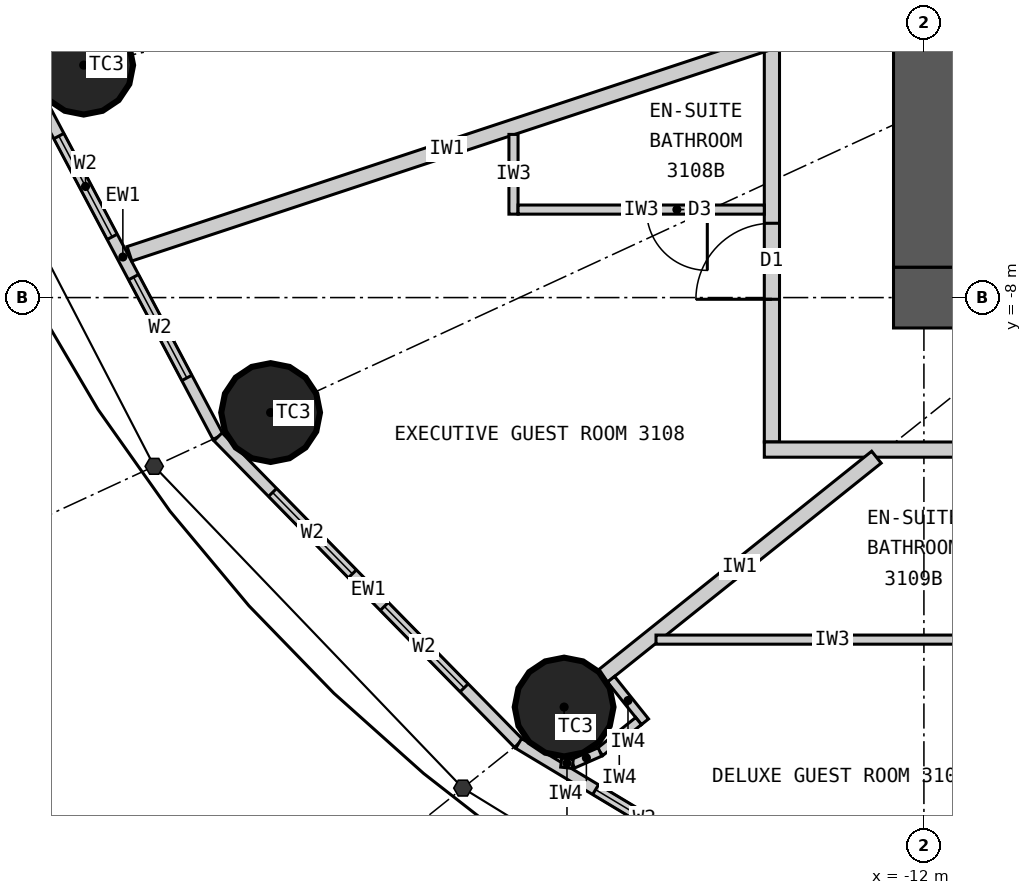
"""IFC4 building model, lengths in metres.
Left out: names, types, materials, properties, quantities, classifications, styles, units other than length and angle.
Written with IfcOpenShell. Run it as: python <this file> out.ifc"""

import sys

from ifc_helpers import new_model, si_unit, direction, frame, frame_2d, origin, origin_2d, place, context, subcontext, project, spatial, rectangle, circle, extrude, element, fill, save


model = new_model("IFC4")
c1 = context("Model", 3, precision=1e-05, world=origin(), true_north=direction((0.0, 1.0)))
c2 = subcontext(c1, "Body", "Model", "MODEL_VIEW")
j1 = project(units=[si_unit("LENGTHUNIT", "METRE"), si_unit("PLANEANGLEUNIT", "RADIAN")], contexts=[c1])
p1 = place(None, origin())
s1 = spatial("IfcSite", under=j1, at=p1, CompositionType="ELEMENT")
p2 = place(p1, origin())
s2 = spatial("IfcBuilding", under=s1, at=p2, CompositionType="ELEMENT")
p3 = place(p2, frame((0.0, 0.0, 122.1)))
s3 = spatial("IfcBuildingStorey", under=s2, at=p3, CompositionType="ELEMENT", Elevation=122.1)
for number, where, z_axis, x_axis in (
    (1, (-23.055, -4.942, 0.0), (0.0, 0.0, 1.0), (1.0, 0.0, 0.0)),
    (2, (-20.596, -9.513, 0.0), (0.0, 0.0, 1.0), (1.0, 0.0, 0.0)),
    (3, (-16.734, -13.387, 0.0), (0.0, 0.0, 1.0), (1.0, 0.0, 0.0)),
):
    element("IfcColumn", number, at=place(p3, frame(where, z_axis=z_axis, x_axis=x_axis)), inside=s3, PredefinedType="COLUMN", context=c2, shape_type="SweptSolid", body=[
        extrude(circle(Radius=0.65, at=origin_2d()), origin(), (0.0, 0.0, 1.0), 3.3),
    ])
p4 = place(p3, frame((12.4, -8.0, 0.0), z_axis=(0.0, 0.0, 1.0), x_axis=(-1.0, 0.0, 0.0)))
e4 = element("IfcWall", 4, at=p4, inside=s3, PredefinedType="SHEAR", context=c2, shape_type="SweptSolid", body=[
    extrude(rectangle(XDim=24.8, YDim=0.8, at=frame_2d((12.4, 0.0))), origin(), (0.0, 0.0, 1.0), 3.3),
])
p5 = place(p4, frame((11.1, 0.0, 0.0)))
e5 = element("IfcOpeningElement", 5, at=p5, cuts=e4, PredefinedType="OPENING", context=c2, shape_type="SweptSolid", body=[
    extrude(rectangle(XDim=1.2, YDim=2.2, at=frame_2d((0.6, 1.1))), frame((0.0, 0.41, 0.0), z_axis=(0.0, -1.0, 0.0), x_axis=(1.0, 0.0, 0.0)), (0.0, 0.0, 1.0), 0.82),
])
p6 = place(p4, frame((18.7, 0.0, 0.0)))
e6 = element("IfcOpeningElement", 6, at=p6, cuts=e4, PredefinedType="OPENING", context=c2, shape_type="SweptSolid", body=[
    extrude(rectangle(XDim=0.9, YDim=2.2, at=frame_2d((0.45, 1.1))), frame((0.0, 0.41, 0.0), z_axis=(0.0, -1.0, 0.0), x_axis=(1.0, 0.0, 0.0)), (0.0, 0.0, 1.0), 0.82),
])
p7 = place(p3, frame((-12.0, 7.6, 0.0), z_axis=(0.0, 0.0, 1.0), x_axis=(0.0, -1.0, 0.0)))
e7 = element("IfcWall", 7, at=p7, inside=s3, PredefinedType="SHEAR", context=c2, shape_type="SweptSolid", body=[
    extrude(rectangle(XDim=15.2, YDim=0.8, at=frame_2d((7.6, 0.0))), origin(), (0.0, 0.0, 1.0), 3.3),
])
p8 = place(p7, frame((6.7, 0.0, 0.0)))
e8 = element("IfcOpeningElement", 8, at=p8, cuts=e7, PredefinedType="OPENING", context=c2, shape_type="SweptSolid", body=[
    extrude(rectangle(XDim=1.8, YDim=2.2, at=frame_2d((0.9, 1.1))), frame((0.0, 0.41, 0.0), z_axis=(0.0, -1.0, 0.0), x_axis=(1.0, 0.0, 0.0)), (0.0, 0.0, 1.0), 0.82),
])
p9 = place(p3, frame((-23.792, -5.1, 0.0), z_axis=(0.0, 0.0, 1.0), x_axis=(0.467814388454, -0.883826735257, 0.0)))
e9 = element("IfcWall", 9, at=p9, inside=s3, PredefinedType="ELEMENTEDWALL", context=c2, shape_type="SweptSolid", body=[
    extrude(rectangle(XDim=5.354, YDim=0.15, at=frame_2d((2.677, 0.0))), origin(), (0.0, 0.0, 1.0), 3.12),
])
p10 = place(p9, frame((0.877, 0.0, 0.9)))
e10 = element("IfcOpeningElement", 10, at=p10, cuts=e9, PredefinedType="OPENING", context=c2, shape_type="SweptSolid", body=[
    extrude(rectangle(XDim=1.5, YDim=1.9, at=frame_2d((0.75, 0.95))), frame((0.0, 0.085, 0.0), z_axis=(0.0, -1.0, 0.0), x_axis=(1.0, 0.0, 0.0)), (0.0, 0.0, 1.0), 0.17),
])
p11 = place(p9, frame((2.977, 0.0, 0.9)))
e11 = element("IfcOpeningElement", 11, at=p11, cuts=e9, PredefinedType="OPENING", context=c2, shape_type="SweptSolid", body=[
    extrude(rectangle(XDim=1.5, YDim=1.9, at=frame_2d((0.75, 0.95))), frame((0.0, 0.085, 0.0), z_axis=(0.0, -1.0, 0.0), x_axis=(1.0, 0.0, 0.0)), (0.0, 0.0, 1.0), 0.17),
])
p12 = place(p3, frame((-21.287, -9.832, 0.0), z_axis=(0.0, 0.0, 1.0), x_axis=(0.700136650834, -0.714008872605, 0.0)))
e12 = element("IfcWall", 12, at=p12, inside=s3, PredefinedType="ELEMENTEDWALL", context=c2, shape_type="SweptSolid", body=[
    extrude(rectangle(XDim=5.649, YDim=0.15, at=frame_2d((2.825, 0.0))), origin(), (0.0, 0.0, 1.0), 3.12),
])
p13 = place(p12, frame((1.025, 0.0, 0.9)))
e13 = element("IfcOpeningElement", 13, at=p13, cuts=e12, PredefinedType="OPENING", context=c2, shape_type="SweptSolid", body=[
    extrude(rectangle(XDim=1.5, YDim=1.9, at=frame_2d((0.75, 0.95))), frame((0.0, 0.085, 0.0), z_axis=(0.0, -1.0, 0.0), x_axis=(1.0, 0.0, 0.0)), (0.0, 0.0, 1.0), 0.17),
])
p14 = place(p12, frame((3.125, 0.0, 0.9)))
e14 = element("IfcOpeningElement", 14, at=p14, cuts=e12, PredefinedType="OPENING", context=c2, shape_type="SweptSolid", body=[
    extrude(rectangle(XDim=1.5, YDim=1.9, at=frame_2d((0.75, 0.95))), frame((0.0, 0.085, 0.0), z_axis=(0.0, -1.0, 0.0), x_axis=(1.0, 0.0, 0.0)), (0.0, 0.0, 1.0), 0.17),
])
p15 = place(p3, frame((-17.332, -13.866, 0.0), z_axis=(0.0, 0.0, 1.0), x_axis=(0.857308573723, -0.514802884044, 0.0)))
e15 = element("IfcWall", 15, at=p15, inside=s3, PredefinedType="ELEMENTEDWALL", context=c2, shape_type="SweptSolid", body=[
    extrude(rectangle(XDim=5.961, YDim=0.15, at=frame_2d((2.98, 0.0))), origin(), (0.0, 0.0, 1.0), 3.12),
])
p16 = place(p15, frame((1.181, 0.0, 0.9)))
e16 = element("IfcOpeningElement", 16, at=p16, cuts=e15, PredefinedType="OPENING", context=c2, shape_type="SweptSolid", body=[
    extrude(rectangle(XDim=1.5, YDim=1.9, at=frame_2d((0.75, 0.95))), frame((0.0, 0.085, 0.0), z_axis=(0.0, -1.0, 0.0), x_axis=(1.0, 0.0, 0.0)), (0.0, 0.0, 1.0), 0.17),
])
p17 = place(p15, frame((3.281, 0.0, 0.9)))
e17 = element("IfcOpeningElement", 17, at=p17, cuts=e15, PredefinedType="OPENING", context=c2, shape_type="SweptSolid", body=[
    extrude(rectangle(XDim=1.5, YDim=1.9, at=frame_2d((0.75, 0.95))), frame((0.0, 0.085, 0.0), z_axis=(0.0, -1.0, 0.0), x_axis=(1.0, 0.0, 0.0)), (0.0, 0.0, 1.0), 0.17),
])
p18 = place(p3, frame((-14.0, 9.9, 0.0), z_axis=(0.0, 0.0, 1.0), x_axis=(0.0, -1.0, 0.0)))
e18 = element("IfcWall", 18, at=p18, inside=s3, PredefinedType="PARTITIONING", context=c2, shape_type="SweptSolid", body=[
    extrude(rectangle(XDim=19.8, YDim=0.2, at=frame_2d((9.9, 0.0))), origin(), (0.0, 0.0, 1.0), 3.12),
])
p19 = place(p18, frame((1.678, 0.0, 0.0)))
e19 = element("IfcOpeningElement", 19, at=p19, cuts=e18, PredefinedType="OPENING", context=c2, shape_type="SweptSolid", body=[
    extrude(rectangle(XDim=1.0, YDim=2.2, at=frame_2d((0.5, 1.1))), frame((0.0, 0.11, 0.0), z_axis=(0.0, -1.0, 0.0), x_axis=(1.0, 0.0, 0.0)), (0.0, 0.0, 1.0), 0.22),
])
p20 = place(p18, frame((7.598, 0.0, 0.0)))
e20 = element("IfcOpeningElement", 20, at=p20, cuts=e18, PredefinedType="OPENING", context=c2, shape_type="SweptSolid", body=[
    extrude(rectangle(XDim=1.0, YDim=2.2, at=frame_2d((0.5, 1.1))), frame((0.0, 0.11, 0.0), z_axis=(0.0, -1.0, 0.0), x_axis=(1.0, 0.0, 0.0)), (0.0, 0.0, 1.0), 0.22),
])
p21 = place(p18, frame((12.26, 0.0, 0.0)))
e21 = element("IfcOpeningElement", 21, at=p21, cuts=e18, PredefinedType="OPENING", context=c2, shape_type="SweptSolid", body=[
    extrude(rectangle(XDim=1.0, YDim=2.2, at=frame_2d((0.5, 1.1))), frame((0.0, 0.11, 0.0), z_axis=(0.0, -1.0, 0.0), x_axis=(1.0, 0.0, 0.0)), (0.0, 0.0, 1.0), 0.22),
])
p22 = place(p18, frame((16.922, 0.0, 0.0)))
e22 = element("IfcOpeningElement", 22, at=p22, cuts=e18, PredefinedType="OPENING", context=c2, shape_type="SweptSolid", body=[
    extrude(rectangle(XDim=1.0, YDim=2.2, at=frame_2d((0.5, 1.1))), frame((0.0, 0.11, 0.0), z_axis=(0.0, -1.0, 0.0), x_axis=(1.0, 0.0, 0.0)), (0.0, 0.0, 1.0), 0.22),
])
p23 = place(p3, frame((-3.283, -10.0, 0.0), z_axis=(0.0, 0.0, 1.0), x_axis=(-1.0, 0.0, 0.0)))
e23 = element("IfcWall", 23, at=p23, inside=s3, PredefinedType="PARTITIONING", context=c2, shape_type="SweptSolid", body=[
    extrude(rectangle(XDim=10.817, YDim=0.2, at=frame_2d((5.409, 0.0))), origin(), (0.0, 0.0, 1.0), 3.12),
])
p24 = place(p23, frame((6.482, 0.0, 0.0)))
e24 = element("IfcOpeningElement", 24, at=p24, cuts=e23, PredefinedType="OPENING", context=c2, shape_type="SweptSolid", body=[
    extrude(rectangle(XDim=1.0, YDim=2.2, at=frame_2d((0.5, 1.1))), frame((0.0, 0.11, 0.0), z_axis=(0.0, -1.0, 0.0), x_axis=(1.0, 0.0, 0.0)), (0.0, 0.0, 1.0), 0.22),
])
p25 = place(p3, frame((-14.1, -4.662, 0.0), z_axis=(0.0, 0.0, 1.0), x_axis=(-0.949446466373, -0.313928984789, 0.0)))
e25 = element("IfcWall", 25, at=p25, inside=s3, PredefinedType="PARTITIONING", context=c2, shape_type="SweptSolid", body=[
    extrude(rectangle(XDim=8.797, YDim=0.2, at=frame_2d((4.399, 0.0))), origin(), (0.0, 0.0, 1.0), 3.12),
])
p26 = place(p3, frame((-12.625, -10.1, 0.0), z_axis=(0.0, 0.0, 1.0), x_axis=(-0.780863644897, -0.624701503182, 0.0)))
e26 = element("IfcWall", 26, at=p26, inside=s3, PredefinedType="PARTITIONING", context=c2, shape_type="SweptSolid", body=[
    extrude(rectangle(XDim=4.612, YDim=0.2, at=frame_2d((2.306, 0.0))), origin(), (0.0, 0.0, 1.0), 2.37),
])
p27 = place(p3, frame((-17.4, -5.854, 0.0), z_axis=(0.0, 0.0, 1.0), x_axis=(0.0, -1.0, 0.0)))
e27 = element("IfcWall", 27, at=p27, inside=s3, PredefinedType="PARTITIONING", context=c2, shape_type="SweptSolid", body=[
    extrude(rectangle(XDim=1.049, YDim=0.12, at=frame_2d((0.524, 0.0))), origin(), (0.0, 0.0, 1.0), 3.12),
])
p28 = place(p3, frame((-14.1, -6.842, 0.0), z_axis=(0.0, 0.0, 1.0), x_axis=(-1.0, 0.0, 0.0)))
e28 = element("IfcWall", 28, at=p28, inside=s3, PredefinedType="PARTITIONING", context=c2, shape_type="SweptSolid", body=[
    extrude(rectangle(XDim=3.24, YDim=0.12, at=frame_2d((1.62, 0.0))), origin(), (0.0, 0.0, 1.0), 3.12),
])
p29 = place(p28, frame((0.75, 0.0, 0.0)))
e29 = element("IfcOpeningElement", 29, at=p29, cuts=e28, PredefinedType="OPENING", context=c2, shape_type="SweptSolid", body=[
    extrude(rectangle(XDim=0.8, YDim=2.1, at=frame_2d((0.4, 1.05))), frame((0.0, 0.07, 0.0), z_axis=(0.0, -1.0, 0.0), x_axis=(1.0, 0.0, 0.0)), (0.0, 0.0, 1.0), 0.14),
])
p30 = place(p3, frame((-15.525, -12.5, 0.0), z_axis=(0.0, 0.0, 1.0), x_axis=(1.0, 0.0, 0.0)))
e30 = element("IfcWall", 30, at=p30, inside=s3, PredefinedType="PARTITIONING", context=c2, shape_type="SweptSolid", body=[
    extrude(rectangle(XDim=4.64, YDim=0.12, at=frame_2d((2.32, 0.0))), origin(), (0.0, 0.0, 1.0), 3.12),
])
p31 = place(p3, frame((-16.117, -13.022, 0.0), z_axis=(0.0, 0.0, 1.0), x_axis=(0.62465344249, -0.780902091677, 0.0)))
e31 = element("IfcWall", 31, at=p31, inside=s3, PredefinedType="PARTITIONING", context=c2, shape_type="SweptSolid", body=[
    extrude(rectangle(XDim=0.716, YDim=0.12, at=frame_2d((0.358, 0.0))), origin(), (0.0, 0.0, 1.0), 3.12),
])
p32 = place(p3, frame((-15.754, -13.571, 0.0), z_axis=(0.0, 0.0, 1.0), x_axis=(-0.780905453553, -0.624649239663, 0.0)))
e32 = element("IfcWall", 32, at=p32, inside=s3, PredefinedType="PARTITIONING", context=c2, shape_type="SweptSolid", body=[
    extrude(rectangle(XDim=0.65, YDim=0.12, at=frame_2d((0.325, 0.0))), origin(), (0.0, 0.0, 1.0), 3.12),
])
p33 = place(p3, frame((-16.262, -13.977, 0.0), z_axis=(0.0, 0.0, 1.0), x_axis=(-0.915985403703, -0.401211590314, 0.0)))
e33 = element("IfcWall", 33, at=p33, inside=s3, PredefinedType="PARTITIONING", context=c2, shape_type="SweptSolid", body=[
    extrude(rectangle(XDim=0.391, YDim=0.12, at=frame_2d((0.196, 0.0))), origin(), (0.0, 0.0, 1.0), 3.12),
])
p34 = place(p3, frame((-16.62, -14.134, 0.0), z_axis=(0.0, 0.0, 1.0), x_axis=(-0.993941871493, 0.109907033867, 0.0)))
e34 = element("IfcWall", 34, at=p34, inside=s3, PredefinedType="PARTITIONING", context=c2, shape_type="SweptSolid", body=[
    extrude(rectangle(XDim=0.153, YDim=0.12, at=frame_2d((0.077, 0.0))), origin(), (0.0, 0.0, 1.0), 3.12),
])
p35 = place(p10, origin())
e35 = element("IfcWindow", 35, at=p35, inside=s3, PartitioningType="SINGLE_PANEL", PredefinedType="WINDOW", context=c2, shape_type="SweptSolid", body=[
    extrude(rectangle(XDim=1.5, YDim=1.9, at=frame_2d((0.75, 0.95))), frame((0.0, 0.03, 0.0), z_axis=(0.0, -1.0, 0.0), x_axis=(1.0, 0.0, 0.0)), (0.0, 0.0, 1.0), 0.06),
])
fill(e10, e35)
p36 = place(p11, origin())
e36 = element("IfcWindow", 36, at=p36, inside=s3, PartitioningType="SINGLE_PANEL", PredefinedType="WINDOW", context=c2, shape_type="SweptSolid", body=[
    extrude(rectangle(XDim=1.5, YDim=1.9, at=frame_2d((0.75, 0.95))), frame((0.0, 0.03, 0.0), z_axis=(0.0, -1.0, 0.0), x_axis=(1.0, 0.0, 0.0)), (0.0, 0.0, 1.0), 0.06),
])
fill(e11, e36)
p37 = place(p13, origin())
e37 = element("IfcWindow", 37, at=p37, inside=s3, PartitioningType="SINGLE_PANEL", PredefinedType="WINDOW", context=c2, shape_type="SweptSolid", body=[
    extrude(rectangle(XDim=1.5, YDim=1.9, at=frame_2d((0.75, 0.95))), frame((0.0, 0.03, 0.0), z_axis=(0.0, -1.0, 0.0), x_axis=(1.0, 0.0, 0.0)), (0.0, 0.0, 1.0), 0.06),
])
fill(e13, e37)
p38 = place(p14, origin())
e38 = element("IfcWindow", 38, at=p38, inside=s3, PartitioningType="SINGLE_PANEL", PredefinedType="WINDOW", context=c2, shape_type="SweptSolid", body=[
    extrude(rectangle(XDim=1.5, YDim=1.9, at=frame_2d((0.75, 0.95))), frame((0.0, 0.03, 0.0), z_axis=(0.0, -1.0, 0.0), x_axis=(1.0, 0.0, 0.0)), (0.0, 0.0, 1.0), 0.06),
])
fill(e14, e38)
p39 = place(p16, origin())
e39 = element("IfcWindow", 39, at=p39, inside=s3, PartitioningType="SINGLE_PANEL", PredefinedType="WINDOW", context=c2, shape_type="SweptSolid", body=[
    extrude(rectangle(XDim=1.5, YDim=1.9, at=frame_2d((0.75, 0.95))), frame((0.0, 0.03, 0.0), z_axis=(0.0, -1.0, 0.0), x_axis=(1.0, 0.0, 0.0)), (0.0, 0.0, 1.0), 0.06),
])
fill(e16, e39)
p40 = place(p29, origin())
e40 = element("IfcDoor", 40, at=p40, inside=s3, OperationType="SINGLE_SWING_LEFT", PredefinedType="DOOR", context=c2, shape_type="SweptSolid", body=[
    extrude(rectangle(XDim=0.8, YDim=2.1, at=frame_2d((0.4, 1.05))), frame((0.0, 0.025, 0.0), z_axis=(0.0, -1.0, 0.0), x_axis=(1.0, 0.0, 0.0)), (0.0, 0.0, 1.0), 0.05),
])
fill(e29, e40)
p41 = place(p22, origin())
e41 = element("IfcDoor", 41, at=p41, inside=s3, OperationType="SINGLE_SWING_RIGHT", PredefinedType="DOOR", context=c2, shape_type="SweptSolid", body=[
    extrude(rectangle(XDim=1.0, YDim=2.2, at=frame_2d((0.5, 1.1))), frame((0.0, 0.025, 0.0), z_axis=(0.0, -1.0, 0.0), x_axis=(1.0, 0.0, 0.0)), (0.0, 0.0, 1.0), 0.05),
])
fill(e22, e41)
save(model, sys.argv[1])
